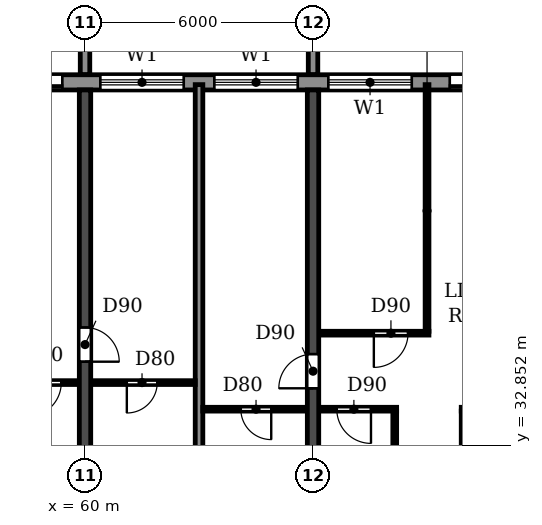
"""IFC4 building model, lengths in metres.
Left out: names, types, materials, properties, quantities, classifications, styles, units other than length and angle.
Written with IfcOpenShell. Run it as: python <this file> out.ifc"""

import sys

from ifc_helpers import new_model, si_unit, direction, frame, frame_2d, origin, place, context, subcontext, project, spatial, polyline, rectangle, outline, extrude, source, transform, mapped, element, fill, save


model = new_model("IFC4")
c1 = context("Model", 3, precision=1e-05, world=origin(), true_north=direction((0.0, 1.0)))
c2 = subcontext(c1, "Body", "Model", "MODEL_VIEW")
j1 = project(units=[si_unit("LENGTHUNIT", "METRE"), si_unit("PLANEANGLEUNIT", "RADIAN")], contexts=[c1])
p1 = place(None, origin())
s1 = spatial("IfcSite", under=j1, at=p1, CompositionType="ELEMENT")
p2 = place(p1, origin())
s2 = spatial("IfcBuilding", under=s1, at=p2, CompositionType="ELEMENT")
p3 = place(p2, frame((0.0, 0.0, 162.0)))
s3 = spatial("IfcBuildingStorey", under=s2, at=p3, CompositionType="ELEMENT", Elevation=162.0)
p4 = place(p3, frame((60.0, 30.525, 0.0), z_axis=(0.0, 0.0, 1.0), x_axis=(0.0, 1.0, 0.0)))
e1 = element("IfcWall", 1, at=p4, inside=s3, PredefinedType="SHEAR", context=c2, shape_type="SweptSolid", body=[
    extrude(rectangle(XDim=11.675, YDim=0.3, at=frame_2d((5.837, 0.0))), origin(), (0.0, 0.0, 1.0), 2.95),
])
p5 = place(p4, frame((4.525, 0.0, 0.0)))
e2 = element("IfcOpeningElement", 2, at=p5, cuts=e1, PredefinedType="OPENING", context=c2, shape_type="SweptSolid", body=[
    extrude(rectangle(XDim=0.9, YDim=2.1, at=frame_2d((0.45, 1.05))), frame((0.0, 0.16, 0.0), z_axis=(0.0, -1.0, 0.0), x_axis=(1.0, 0.0, 0.0)), (0.0, 0.0, 1.0), 0.32),
])
p6 = place(p3, frame((66.0, 30.525, 0.0), z_axis=(0.0, 0.0, 1.0), x_axis=(0.0, 1.0, 0.0)))
e3 = element("IfcWall", 3, at=p6, inside=s3, PredefinedType="SHEAR", context=c2, shape_type="SweptSolid", body=[
    extrude(rectangle(XDim=11.675, YDim=0.3, at=frame_2d((5.837, 0.0))), origin(), (0.0, 0.0, 1.0), 2.95),
])
p7 = place(p6, frame((3.825, 0.0, 0.0)))
e4 = element("IfcOpeningElement", 4, at=p7, cuts=e3, PredefinedType="OPENING", context=c2, shape_type="SweptSolid", body=[
    extrude(rectangle(XDim=0.9, YDim=2.1, at=frame_2d((0.45, 1.05))), frame((0.0, 0.16, 0.0), z_axis=(0.0, -1.0, 0.0), x_axis=(1.0, 0.0, 0.0)), (0.0, 0.0, 1.0), 0.32),
])
p8 = place(p3, frame((79.317, 42.4, 0.0), z_axis=(0.0, 0.0, 1.0), x_axis=(-1.0, 0.0, 0.0)))
e5 = element("IfcWall", 5, at=p8, inside=s3, PredefinedType="STANDARD", context=c2, shape_type="SweptSolid", body=[
    extrude(rectangle(XDim=56.634, YDim=0.4, at=frame_2d((28.317, 0.0))), origin(), (0.0, 0.0, 1.0), 2.95),
])
p9 = place(p8, frame((52.717, 0.0, 0.9)))
e6 = element("IfcOpeningElement", 6, at=p9, cuts=e5, PredefinedType="OPENING", context=c2, shape_type="SweptSolid", body=[
    extrude(rectangle(XDim=2.2, YDim=1.5, at=frame_2d((1.1, 0.75))), frame((0.0, 0.21, 0.0), z_axis=(0.0, -1.0, 0.0), x_axis=(1.0, 0.0, 0.0)), (0.0, 0.0, 1.0), 0.42),
])
p10 = place(p8, frame((49.917, 0.0, 0.0)))
e7 = element("IfcOpeningElement", 7, at=p10, cuts=e5, PredefinedType="OPENING", context=c2, shape_type="SweptSolid", body=[
    extrude(rectangle(XDim=1.8, YDim=2.4, at=frame_2d((0.9, 1.2))), frame((0.0, 0.21, 0.0), z_axis=(0.0, -1.0, 0.0), x_axis=(1.0, 0.0, 0.0)), (0.0, 0.0, 1.0), 0.42),
])
p11 = place(p8, frame((46.717, 0.0, 0.9)))
e8 = element("IfcOpeningElement", 8, at=p11, cuts=e5, PredefinedType="OPENING", context=c2, shape_type="SweptSolid", body=[
    extrude(rectangle(XDim=2.2, YDim=1.5, at=frame_2d((1.1, 0.75))), frame((0.0, 0.21, 0.0), z_axis=(0.0, -1.0, 0.0), x_axis=(1.0, 0.0, 0.0)), (0.0, 0.0, 1.0), 0.42),
])
p12 = place(p8, frame((43.917, 0.0, 0.0)))
e9 = element("IfcOpeningElement", 9, at=p12, cuts=e5, PredefinedType="OPENING", context=c2, shape_type="SweptSolid", body=[
    extrude(rectangle(XDim=1.8, YDim=2.4, at=frame_2d((0.9, 1.2))), frame((0.0, 0.21, 0.0), z_axis=(0.0, -1.0, 0.0), x_axis=(1.0, 0.0, 0.0)), (0.0, 0.0, 1.0), 0.42),
])
p13 = place(p8, frame((40.717, 0.0, 0.9)))
e10 = element("IfcOpeningElement", 10, at=p13, cuts=e5, PredefinedType="OPENING", context=c2, shape_type="SweptSolid", body=[
    extrude(rectangle(XDim=2.2, YDim=1.5, at=frame_2d((1.1, 0.75))), frame((0.0, 0.21, 0.0), z_axis=(0.0, -1.0, 0.0), x_axis=(1.0, 0.0, 0.0)), (0.0, 0.0, 1.0), 0.42),
])
p14 = place(p8, frame((37.917, 0.0, 0.0)))
e11 = element("IfcOpeningElement", 11, at=p14, cuts=e5, PredefinedType="OPENING", context=c2, shape_type="SweptSolid", body=[
    extrude(rectangle(XDim=1.8, YDim=2.4, at=frame_2d((0.9, 1.2))), frame((0.0, 0.21, 0.0), z_axis=(0.0, -1.0, 0.0), x_axis=(1.0, 0.0, 0.0)), (0.0, 0.0, 1.0), 0.42),
])
p15 = place(p8, frame((34.717, 0.0, 0.9)))
e12 = element("IfcOpeningElement", 12, at=p15, cuts=e5, PredefinedType="OPENING", context=c2, shape_type="SweptSolid", body=[
    extrude(rectangle(XDim=2.2, YDim=1.5, at=frame_2d((1.1, 0.75))), frame((0.0, 0.21, 0.0), z_axis=(0.0, -1.0, 0.0), x_axis=(1.0, 0.0, 0.0)), (0.0, 0.0, 1.0), 0.42),
])
p16 = place(p8, frame((31.717, 0.0, 0.9)))
e13 = element("IfcOpeningElement", 13, at=p16, cuts=e5, PredefinedType="OPENING", context=c2, shape_type="SweptSolid", body=[
    extrude(rectangle(XDim=2.2, YDim=1.5, at=frame_2d((1.1, 0.75))), frame((0.0, 0.21, 0.0), z_axis=(0.0, -1.0, 0.0), x_axis=(1.0, 0.0, 0.0)), (0.0, 0.0, 1.0), 0.42),
])
p17 = place(p8, frame((28.717, 0.0, 0.9)))
e14 = element("IfcOpeningElement", 14, at=p17, cuts=e5, PredefinedType="OPENING", context=c2, shape_type="SweptSolid", body=[
    extrude(rectangle(XDim=2.2, YDim=1.5, at=frame_2d((1.1, 0.75))), frame((0.0, 0.21, 0.0), z_axis=(0.0, -1.0, 0.0), x_axis=(1.0, 0.0, 0.0)), (0.0, 0.0, 1.0), 0.42),
])
p18 = place(p8, frame((25.717, 0.0, 0.9)))
e15 = element("IfcOpeningElement", 15, at=p18, cuts=e5, PredefinedType="OPENING", context=c2, shape_type="SweptSolid", body=[
    extrude(rectangle(XDim=2.2, YDim=1.5, at=frame_2d((1.1, 0.75))), frame((0.0, 0.21, 0.0), z_axis=(0.0, -1.0, 0.0), x_axis=(1.0, 0.0, 0.0)), (0.0, 0.0, 1.0), 0.42),
])
p19 = place(p8, frame((22.717, 0.0, 0.9)))
e16 = element("IfcOpeningElement", 16, at=p19, cuts=e5, PredefinedType="OPENING", context=c2, shape_type="SweptSolid", body=[
    extrude(rectangle(XDim=2.2, YDim=1.5, at=frame_2d((1.1, 0.75))), frame((0.0, 0.21, 0.0), z_axis=(0.0, -1.0, 0.0), x_axis=(1.0, 0.0, 0.0)), (0.0, 0.0, 1.0), 0.42),
])
p20 = place(p8, frame((19.917, 0.0, 0.0)))
e17 = element("IfcOpeningElement", 17, at=p20, cuts=e5, PredefinedType="OPENING", context=c2, shape_type="SweptSolid", body=[
    extrude(rectangle(XDim=1.8, YDim=2.4, at=frame_2d((0.9, 1.2))), frame((0.0, 0.21, 0.0), z_axis=(0.0, -1.0, 0.0), x_axis=(1.0, 0.0, 0.0)), (0.0, 0.0, 1.0), 0.42),
])
p21 = place(p8, frame((16.717, 0.0, 0.9)))
e18 = element("IfcOpeningElement", 18, at=p21, cuts=e5, PredefinedType="OPENING", context=c2, shape_type="SweptSolid", body=[
    extrude(rectangle(XDim=2.2, YDim=1.5, at=frame_2d((1.1, 0.75))), frame((0.0, 0.21, 0.0), z_axis=(0.0, -1.0, 0.0), x_axis=(1.0, 0.0, 0.0)), (0.0, 0.0, 1.0), 0.42),
])
p22 = place(p8, frame((13.717, 0.0, 0.9)))
e19 = element("IfcOpeningElement", 19, at=p22, cuts=e5, PredefinedType="OPENING", context=c2, shape_type="SweptSolid", body=[
    extrude(rectangle(XDim=2.2, YDim=1.5, at=frame_2d((1.1, 0.75))), frame((0.0, 0.21, 0.0), z_axis=(0.0, -1.0, 0.0), x_axis=(1.0, 0.0, 0.0)), (0.0, 0.0, 1.0), 0.42),
])
p23 = place(p8, frame((10.717, 0.0, 0.9)))
e20 = element("IfcOpeningElement", 20, at=p23, cuts=e5, PredefinedType="OPENING", context=c2, shape_type="SweptSolid", body=[
    extrude(rectangle(XDim=2.2, YDim=1.5, at=frame_2d((1.1, 0.75))), frame((0.0, 0.21, 0.0), z_axis=(0.0, -1.0, 0.0), x_axis=(1.0, 0.0, 0.0)), (0.0, 0.0, 1.0), 0.42),
])
p24 = place(p8, frame((7.917, 0.0, 0.0)))
e21 = element("IfcOpeningElement", 21, at=p24, cuts=e5, PredefinedType="OPENING", context=c2, shape_type="SweptSolid", body=[
    extrude(rectangle(XDim=1.8, YDim=2.4, at=frame_2d((0.9, 1.2))), frame((0.0, 0.21, 0.0), z_axis=(0.0, -1.0, 0.0), x_axis=(1.0, 0.0, 0.0)), (0.0, 0.0, 1.0), 0.42),
])
p25 = place(p8, frame((4.717, 0.0, 0.9)))
e22 = element("IfcOpeningElement", 22, at=p25, cuts=e5, PredefinedType="OPENING", context=c2, shape_type="SweptSolid", body=[
    extrude(rectangle(XDim=2.2, YDim=1.5, at=frame_2d((1.1, 0.75))), frame((0.0, 0.21, 0.0), z_axis=(0.0, -1.0, 0.0), x_axis=(1.0, 0.0, 0.0)), (0.0, 0.0, 1.0), 0.42),
])
p26 = place(p8, frame((1.917, 0.0, 0.0)))
e23 = element("IfcOpeningElement", 23, at=p26, cuts=e5, PredefinedType="OPENING", context=c2, shape_type="SweptSolid", body=[
    extrude(rectangle(XDim=1.8, YDim=2.4, at=frame_2d((0.9, 1.2))), frame((0.0, 0.21, 0.0), z_axis=(0.0, -1.0, 0.0), x_axis=(1.0, 0.0, 0.0)), (0.0, 0.0, 1.0), 0.42),
])
m1 = source(origin(), c2, "Body", "SweptSolid", [
    extrude(outline(polyline([(0.0, 0.0), (0.25, 0.0), (0.25, 3.1), (0.0, 3.1), (0.0, 0.0)])), origin(), (0.0, 0.0, 1.0), 3.1),
])
for number, where in (
    (24, (59.875, 42.6, 0.0)),
    (25, (65.875, 42.6, 0.0)),
):
    element("IfcWall", number, at=place(p3, frame(where)), inside=s3, PredefinedType="STANDARD", context=c2, shape_type="MappedRepresentation", body=[
        mapped(m1, transform((0.0, 0.0, 0.0))),
    ])
p27 = place(p3, frame((63.0, 30.535, 0.0), z_axis=(0.0, 0.0, 1.0), x_axis=(0.0, 1.0, 0.0)))
e26 = element("IfcWall", 26, at=p27, inside=s3, PredefinedType="PARTITIONING", context=c2, shape_type="SweptSolid", body=[
    extrude(rectangle(XDim=11.805, YDim=0.2, at=frame_2d((5.903, 0.0))), origin(), (0.0, 0.0, 1.0), 2.95),
])
p28 = place(p3, frame((63.1, 33.8, 0.0), z_axis=(0.0, 0.0, 1.0), x_axis=(1.0, 0.0, 0.0)))
e27 = element("IfcWall", 27, at=p28, inside=s3, PredefinedType="PARTITIONING", context=c2, shape_type="SweptSolid", body=[
    extrude(rectangle(XDim=2.74, YDim=0.1, at=frame_2d((1.37, 0.0))), origin(), (0.0, 0.0, 1.0), 2.95),
])
p29 = place(p28, frame((1.0, 0.0, 0.0)))
e28 = element("IfcOpeningElement", 28, at=p29, cuts=e27, PredefinedType="OPENING", context=c2, shape_type="SweptSolid", body=[
    extrude(rectangle(XDim=0.8, YDim=2.1, at=frame_2d((0.4, 1.05))), frame((0.0, 0.06, 0.0), z_axis=(0.0, -1.0, 0.0), x_axis=(1.0, 0.0, 0.0)), (0.0, 0.0, 1.0), 0.12),
])
p30 = place(p3, frame((66.16, 33.8, 0.0), z_axis=(0.0, 0.0, 1.0), x_axis=(1.0, 0.0, 0.0)))
e29 = element("IfcWall", 29, at=p30, inside=s3, PredefinedType="PARTITIONING", context=c2, shape_type="SweptSolid", body=[
    extrude(rectangle(XDim=2.04, YDim=0.1, at=frame_2d((1.02, 0.0))), origin(), (0.0, 0.0, 1.0), 2.95),
])
p31 = place(p30, frame((0.465, 0.0, 0.0)))
e30 = element("IfcOpeningElement", 30, at=p31, cuts=e29, PredefinedType="OPENING", context=c2, shape_type="SweptSolid", body=[
    extrude(rectangle(XDim=0.9, YDim=2.1, at=frame_2d((0.45, 1.05))), frame((0.0, 0.06, 0.0), z_axis=(0.0, -1.0, 0.0), x_axis=(1.0, 0.0, 0.0)), (0.0, 0.0, 1.0), 0.12),
])
p32 = place(p3, frame((69.9, 33.8, 0.0), z_axis=(0.0, 0.0, 1.0), x_axis=(1.0, 0.0, 0.0)))
e31 = element("IfcWall", 31, at=p32, inside=s3, PredefinedType="PARTITIONING", context=c2, shape_type="SweptSolid", body=[
    extrude(rectangle(XDim=1.94, YDim=0.1, at=frame_2d((0.97, 0.0))), origin(), (0.0, 0.0, 1.0), 2.95),
])
p33 = place(p32, frame((0.675, 0.0, 0.0)))
e32 = element("IfcOpeningElement", 32, at=p33, cuts=e31, PredefinedType="OPENING", context=c2, shape_type="SweptSolid", body=[
    extrude(rectangle(XDim=0.8, YDim=2.1, at=frame_2d((0.4, 1.05))), frame((0.0, 0.06, 0.0), z_axis=(0.0, -1.0, 0.0), x_axis=(1.0, 0.0, 0.0)), (0.0, 0.0, 1.0), 0.12),
])
p34 = place(p3, frame((57.8, 34.5, 0.0), z_axis=(0.0, 0.0, 1.0), x_axis=(1.0, 0.0, 0.0)))
e33 = element("IfcWall", 33, at=p34, inside=s3, PredefinedType="PARTITIONING", context=c2, shape_type="SweptSolid", body=[
    extrude(rectangle(XDim=2.04, YDim=0.1, at=frame_2d((1.02, 0.0))), origin(), (0.0, 0.0, 1.0), 2.95),
])
p35 = place(p34, frame((0.675, 0.0, 0.0)))
e34 = element("IfcOpeningElement", 34, at=p35, cuts=e33, PredefinedType="OPENING", context=c2, shape_type="SweptSolid", body=[
    extrude(rectangle(XDim=0.9, YDim=2.1, at=frame_2d((0.45, 1.05))), frame((0.0, 0.06, 0.0), z_axis=(0.0, -1.0, 0.0), x_axis=(1.0, 0.0, 0.0)), (0.0, 0.0, 1.0), 0.12),
])
p36 = place(p3, frame((60.16, 34.5, 0.0), z_axis=(0.0, 0.0, 1.0), x_axis=(1.0, 0.0, 0.0)))
e35 = element("IfcWall", 35, at=p36, inside=s3, PredefinedType="PARTITIONING", context=c2, shape_type="SweptSolid", body=[
    extrude(rectangle(XDim=2.74, YDim=0.1, at=frame_2d((1.37, 0.0))), origin(), (0.0, 0.0, 1.0), 2.95),
])
p37 = place(p36, frame((0.94, 0.0, 0.0)))
e36 = element("IfcOpeningElement", 36, at=p37, cuts=e35, PredefinedType="OPENING", context=c2, shape_type="SweptSolid", body=[
    extrude(rectangle(XDim=0.8, YDim=2.1, at=frame_2d((0.4, 1.05))), frame((0.0, 0.06, 0.0), z_axis=(0.0, -1.0, 0.0), x_axis=(1.0, 0.0, 0.0)), (0.0, 0.0, 1.0), 0.12),
])
p38 = place(p3, frame((66.16, 35.8, 0.0), z_axis=(0.0, 0.0, 1.0), x_axis=(1.0, 0.0, 0.0)))
e37 = element("IfcWall", 37, at=p38, inside=s3, PredefinedType="PARTITIONING", context=c2, shape_type="SweptSolid", body=[
    extrude(rectangle(XDim=2.89, YDim=0.1, at=frame_2d((1.445, 0.0))), origin(), (0.0, 0.0, 1.0), 2.95),
])
p39 = place(p38, frame((1.44, 0.0, 0.0)))
e38 = element("IfcOpeningElement", 38, at=p39, cuts=e37, PredefinedType="OPENING", context=c2, shape_type="SweptSolid", body=[
    extrude(rectangle(XDim=0.9, YDim=2.1, at=frame_2d((0.45, 1.05))), frame((0.0, 0.06, 0.0), z_axis=(0.0, -1.0, 0.0), x_axis=(1.0, 0.0, 0.0)), (0.0, 0.0, 1.0), 0.12),
])
p40 = place(p3, frame((68.15, 30.535, 0.0), z_axis=(0.0, 0.0, 1.0), x_axis=(0.0, 1.0, 0.0)))
e39 = element("IfcWall", 39, at=p40, inside=s3, PredefinedType="PARTITIONING", context=c2, shape_type="SweptSolid", body=[
    extrude(rectangle(XDim=3.215, YDim=0.1, at=frame_2d((1.607, 0.0))), origin(), (0.0, 0.0, 1.0), 2.95),
])
p41 = place(p3, frame((69.0, 35.85, 0.0), z_axis=(0.0, 0.0, 1.0), x_axis=(0.0, 1.0, 0.0)))
e40 = element("IfcWall", 40, at=p41, inside=s3, PredefinedType="PARTITIONING", context=c2, shape_type="SweptSolid", body=[
    extrude(rectangle(XDim=6.49, YDim=0.1, at=frame_2d((3.245, 0.0))), origin(), (0.0, 0.0, 1.0), 2.95),
])
p42 = place(p3, frame((69.95, 30.535, 0.0), z_axis=(0.0, 0.0, 1.0), x_axis=(0.0, 1.0, 0.0)))
e41 = element("IfcWall", 41, at=p42, inside=s3, PredefinedType="PARTITIONING", context=c2, shape_type="SweptSolid", body=[
    extrude(rectangle(XDim=3.215, YDim=0.1, at=frame_2d((1.607, 0.0))), origin(), (0.0, 0.0, 1.0), 2.95),
])
p43 = place(p20, origin())
e42 = element("IfcDoor", 42, at=p43, inside=s3, OperationType="DOUBLE_DOOR_SLIDING", PredefinedType="DOOR", context=c2, shape_type="SweptSolid", body=[
    extrude(rectangle(XDim=1.8, YDim=2.4, at=frame_2d((0.9, 1.2))), frame((0.0, 0.025, 0.0), z_axis=(0.0, -1.0, 0.0), x_axis=(1.0, 0.0, 0.0)), (0.0, 0.0, 1.0), 0.05),
])
fill(e17, e42)
p44 = place(p21, origin())
e43 = element("IfcWindow", 43, at=p44, inside=s3, PartitioningType="DOUBLE_PANEL_HORIZONTAL", PredefinedType="WINDOW", context=c2, shape_type="SweptSolid", body=[
    extrude(rectangle(XDim=2.2, YDim=1.5, at=frame_2d((1.1, 0.75))), frame((0.0, 0.03, 0.0), z_axis=(0.0, -1.0, 0.0), x_axis=(1.0, 0.0, 0.0)), (0.0, 0.0, 1.0), 0.06),
])
fill(e18, e43)
p45 = place(p22, origin())
e44 = element("IfcWindow", 44, at=p45, inside=s3, PartitioningType="DOUBLE_PANEL_HORIZONTAL", PredefinedType="WINDOW", context=c2, shape_type="SweptSolid", body=[
    extrude(rectangle(XDim=2.2, YDim=1.5, at=frame_2d((1.1, 0.75))), frame((0.0, 0.03, 0.0), z_axis=(0.0, -1.0, 0.0), x_axis=(1.0, 0.0, 0.0)), (0.0, 0.0, 1.0), 0.06),
])
fill(e19, e44)
p46 = place(p23, origin())
e45 = element("IfcWindow", 45, at=p46, inside=s3, PartitioningType="DOUBLE_PANEL_HORIZONTAL", PredefinedType="WINDOW", context=c2, shape_type="SweptSolid", body=[
    extrude(rectangle(XDim=2.2, YDim=1.5, at=frame_2d((1.1, 0.75))), frame((0.0, 0.03, 0.0), z_axis=(0.0, -1.0, 0.0), x_axis=(1.0, 0.0, 0.0)), (0.0, 0.0, 1.0), 0.06),
])
fill(e20, e45)
p47 = place(p24, origin())
e46 = element("IfcDoor", 46, at=p47, inside=s3, OperationType="DOUBLE_DOOR_SLIDING", PredefinedType="DOOR", context=c2, shape_type="SweptSolid", body=[
    extrude(rectangle(XDim=1.8, YDim=2.4, at=frame_2d((0.9, 1.2))), frame((0.0, 0.025, 0.0), z_axis=(0.0, -1.0, 0.0), x_axis=(1.0, 0.0, 0.0)), (0.0, 0.0, 1.0), 0.05),
])
fill(e21, e46)
p48 = place(p37, frame((0.8, 0.0, 0.0), z_axis=(0.0, 0.0, 1.0), x_axis=(-1.0, 0.0, 0.0)))
e47 = element("IfcDoor", 47, at=p48, inside=s3, OperationType="SINGLE_SWING_RIGHT", PredefinedType="DOOR", context=c2, shape_type="SweptSolid", body=[
    extrude(rectangle(XDim=0.8, YDim=2.1, at=frame_2d((0.4, 1.05))), frame((0.0, 0.025, 0.0), z_axis=(0.0, -1.0, 0.0), x_axis=(1.0, 0.0, 0.0)), (0.0, 0.0, 1.0), 0.05),
])
fill(e36, e47)
p49 = place(p35, frame((0.9, 0.0, 0.0), z_axis=(0.0, 0.0, 1.0), x_axis=(-1.0, 0.0, 0.0)))
e48 = element("IfcDoor", 48, at=p49, inside=s3, OperationType="SINGLE_SWING_RIGHT", PredefinedType="DOOR", context=c2, shape_type="SweptSolid", body=[
    extrude(rectangle(XDim=0.9, YDim=2.1, at=frame_2d((0.45, 1.05))), frame((0.0, 0.025, 0.0), z_axis=(0.0, -1.0, 0.0), x_axis=(1.0, 0.0, 0.0)), (0.0, 0.0, 1.0), 0.05),
])
fill(e34, e48)
p50 = place(p5, frame((0.9, 0.0, 0.0), z_axis=(0.0, 0.0, 1.0), x_axis=(-1.0, 0.0, 0.0)))
e49 = element("IfcDoor", 49, at=p50, inside=s3, OperationType="SINGLE_SWING_RIGHT", PredefinedType="DOOR", context=c2, shape_type="SweptSolid", body=[
    extrude(rectangle(XDim=0.9, YDim=2.1, at=frame_2d((0.45, 1.05))), frame((0.0, 0.025, 0.0), z_axis=(0.0, -1.0, 0.0), x_axis=(1.0, 0.0, 0.0)), (0.0, 0.0, 1.0), 0.05),
])
fill(e2, e49)
p51 = place(p29, frame((0.8, 0.0, 0.0), z_axis=(0.0, 0.0, 1.0), x_axis=(-1.0, 0.0, 0.0)))
e50 = element("IfcDoor", 50, at=p51, inside=s3, OperationType="SINGLE_SWING_LEFT", PredefinedType="DOOR", context=c2, shape_type="SweptSolid", body=[
    extrude(rectangle(XDim=0.8, YDim=2.1, at=frame_2d((0.4, 1.05))), frame((0.0, 0.025, 0.0), z_axis=(0.0, -1.0, 0.0), x_axis=(1.0, 0.0, 0.0)), (0.0, 0.0, 1.0), 0.05),
])
fill(e28, e50)
p52 = place(p7, origin())
e51 = element("IfcDoor", 51, at=p52, inside=s3, OperationType="SINGLE_SWING_LEFT", PredefinedType="DOOR", context=c2, shape_type="SweptSolid", body=[
    extrude(rectangle(XDim=0.9, YDim=2.1, at=frame_2d((0.45, 1.05))), frame((0.0, 0.025, 0.0), z_axis=(0.0, -1.0, 0.0), x_axis=(1.0, 0.0, 0.0)), (0.0, 0.0, 1.0), 0.05),
])
fill(e4, e51)
p53 = place(p31, frame((0.9, 0.0, 0.0), z_axis=(0.0, 0.0, 1.0), x_axis=(-1.0, 0.0, 0.0)))
e52 = element("IfcDoor", 52, at=p53, inside=s3, OperationType="SINGLE_SWING_LEFT", PredefinedType="DOOR", context=c2, shape_type="SweptSolid", body=[
    extrude(rectangle(XDim=0.9, YDim=2.1, at=frame_2d((0.45, 1.05))), frame((0.0, 0.025, 0.0), z_axis=(0.0, -1.0, 0.0), x_axis=(1.0, 0.0, 0.0)), (0.0, 0.0, 1.0), 0.05),
])
fill(e30, e52)
p54 = place(p39, frame((0.9, 0.0, 0.0), z_axis=(0.0, 0.0, 1.0), x_axis=(-1.0, 0.0, 0.0)))
e53 = element("IfcDoor", 53, at=p54, inside=s3, OperationType="SINGLE_SWING_RIGHT", PredefinedType="DOOR", context=c2, shape_type="SweptSolid", body=[
    extrude(rectangle(XDim=0.9, YDim=2.1, at=frame_2d((0.45, 1.05))), frame((0.0, 0.025, 0.0), z_axis=(0.0, -1.0, 0.0), x_axis=(1.0, 0.0, 0.0)), (0.0, 0.0, 1.0), 0.05),
])
fill(e38, e53)
save(model, sys.argv[1])
